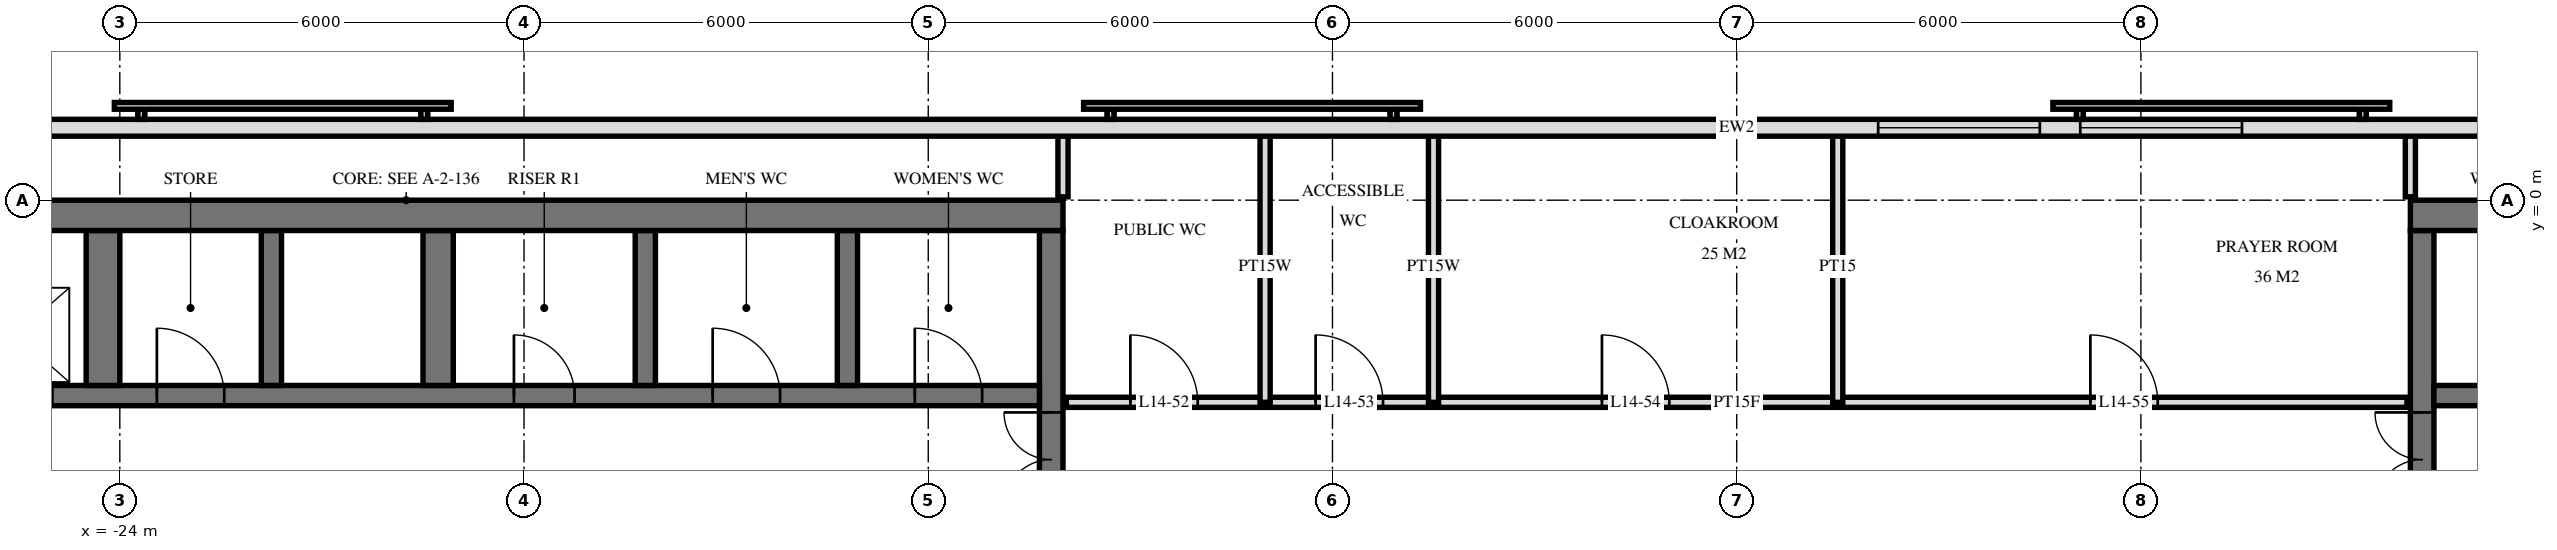
"""IFC4 building model, lengths in metres.
Left out: names, types, materials, properties, quantities, classifications, styles, units other than length and angle.
Written with IfcOpenShell. Run it as: python <this file> out.ifc"""

import sys

from ifc_helpers import new_model, si_unit, direction, frame, frame_2d, origin, place, context, subcontext, project, spatial, rectangle, extrude, element, fill, save


model = new_model("IFC4")
c1 = context("Model", 3, precision=1e-05, world=origin(), true_north=direction((0.0, 1.0)))
c2 = subcontext(c1, "Body", "Model", "MODEL_VIEW")
j1 = project(units=[si_unit("LENGTHUNIT", "METRE"), si_unit("PLANEANGLEUNIT", "RADIAN")], contexts=[c1])
p1 = place(None, origin())
s1 = spatial("IfcSite", under=j1, at=p1, CompositionType="ELEMENT")
p2 = place(p1, origin())
s2 = spatial("IfcBuilding", under=s1, at=p2, CompositionType="ELEMENT")
p3 = place(p2, frame((0.0, 0.0, 60.0)))
s3 = spatial("IfcBuildingStorey", under=s2, at=p3, CompositionType="ELEMENT", Elevation=60.0)
p4 = place(p3, frame((-29.5, -0.225, 0.0), z_axis=(0.0, 0.0, 1.0), x_axis=(1.0, 0.0, 0.0)))
e1 = element("IfcWall", 1, at=p4, inside=s3, PredefinedType="SHEAR", context=c2, shape_type="SweptSolid", body=[
    extrude(rectangle(XDim=19.5, YDim=0.45, at=frame_2d((9.75, 0.0))), origin(), (0.0, 0.0, 1.0), 3.6),
])
p5 = place(p3, frame((-10.175, -14.55, 0.0), z_axis=(0.0, 0.0, 1.0), x_axis=(0.0, 1.0, 0.0)))
e2 = element("IfcWall", 2, at=p5, inside=s3, PredefinedType="SHEAR", context=c2, shape_type="SweptSolid", body=[
    extrude(rectangle(XDim=14.1, YDim=0.35, at=frame_2d((7.05, 0.0))), origin(), (0.0, 0.0, 1.0), 3.6),
])
p6 = place(p5, frame((8.4, 0.0, 0.0)))
e3 = element("IfcOpeningElement", 3, at=p6, cuts=e2, PredefinedType="OPENING", context=c2, shape_type="SweptSolid", body=[
    extrude(rectangle(XDim=1.4, YDim=2.4, at=frame_2d((0.7, 1.2))), frame((0.0, 0.185, 0.0), z_axis=(0.0, -1.0, 0.0), x_axis=(1.0, 0.0, 0.0)), (0.0, 0.0, 1.0), 0.37),
])
p7 = place(p5, frame((10.0, 0.0, 0.0)))
e4 = element("IfcOpeningElement", 4, at=p7, cuts=e2, PredefinedType="OPENING", context=c2, shape_type="SweptSolid", body=[
    extrude(rectangle(XDim=1.4, YDim=2.4, at=frame_2d((0.7, 1.2))), frame((0.0, 0.185, 0.0), z_axis=(0.0, -1.0, 0.0), x_axis=(1.0, 0.0, 0.0)), (0.0, 0.0, 1.0), 0.37),
])
p8 = place(p5, frame((4.0, 0.0, 0.0)))
e5 = element("IfcOpeningElement", 5, at=p8, cuts=e2, PredefinedType="OPENING", context=c2, shape_type="SweptSolid", body=[
    extrude(rectangle(XDim=1.2, YDim=2.1, at=frame_2d((0.6, 1.05))), frame((0.0, 0.185, 0.0), z_axis=(0.0, -1.0, 0.0), x_axis=(1.0, 0.0, 0.0)), (0.0, 0.0, 1.0), 0.37),
])
p9 = place(p3, frame((-29.05, -2.9, 0.0), z_axis=(0.0, 0.0, 1.0), x_axis=(1.0, 0.0, 0.0)))
e6 = element("IfcWall", 6, at=p9, inside=s3, PredefinedType="SHEAR", context=c2, shape_type="SweptSolid", body=[
    extrude(rectangle(XDim=18.7, YDim=0.3, at=frame_2d((9.35, 0.0))), origin(), (0.0, 0.0, 1.0), 3.6),
])
p10 = place(p9, frame((2.95, 0.0, 0.0)))
e7 = element("IfcOpeningElement", 7, at=p10, cuts=e6, PredefinedType="OPENING", context=c2, shape_type="SweptSolid", body=[
    extrude(rectangle(XDim=1.1, YDim=2.1, at=frame_2d((0.55, 1.05))), frame((0.0, 0.16, 0.0), z_axis=(0.0, -1.0, 0.0), x_axis=(1.0, 0.0, 0.0)), (0.0, 0.0, 1.0), 0.32),
])
p11 = place(p9, frame((0.55, 0.0, 0.0)))
e8 = element("IfcOpeningElement", 8, at=p11, cuts=e6, PredefinedType="OPENING", context=c2, shape_type="SweptSolid", body=[
    extrude(rectangle(XDim=1.1, YDim=2.1, at=frame_2d((0.55, 1.05))), frame((0.0, 0.16, 0.0), z_axis=(0.0, -1.0, 0.0), x_axis=(1.0, 0.0, 0.0)), (0.0, 0.0, 1.0), 0.32),
])
p12 = place(p9, frame((10.9, 0.0, 0.0)))
e9 = element("IfcOpeningElement", 9, at=p12, cuts=e6, PredefinedType="OPENING", context=c2, shape_type="SweptSolid", body=[
    extrude(rectangle(XDim=0.9, YDim=2.1, at=frame_2d((0.45, 1.05))), frame((0.0, 0.16, 0.0), z_axis=(0.0, -1.0, 0.0), x_axis=(1.0, 0.0, 0.0)), (0.0, 0.0, 1.0), 0.32),
])
p13 = place(p9, frame((16.85, 0.0, 0.0)))
e10 = element("IfcOpeningElement", 10, at=p13, cuts=e6, PredefinedType="OPENING", context=c2, shape_type="SweptSolid", body=[
    extrude(rectangle(XDim=1.0, YDim=2.1, at=frame_2d((0.5, 1.05))), frame((0.0, 0.16, 0.0), z_axis=(0.0, -1.0, 0.0), x_axis=(1.0, 0.0, 0.0)), (0.0, 0.0, 1.0), 0.32),
])
p14 = place(p9, frame((13.85, 0.0, 0.0)))
e11 = element("IfcOpeningElement", 11, at=p14, cuts=e6, PredefinedType="OPENING", context=c2, shape_type="SweptSolid", body=[
    extrude(rectangle(XDim=1.0, YDim=2.1, at=frame_2d((0.5, 1.05))), frame((0.0, 0.16, 0.0), z_axis=(0.0, -1.0, 0.0), x_axis=(1.0, 0.0, 0.0)), (0.0, 0.0, 1.0), 0.32),
])
p15 = place(p9, frame((5.6, 0.0, 0.0)))
e12 = element("IfcOpeningElement", 12, at=p15, cuts=e6, PredefinedType="OPENING", context=c2, shape_type="SweptSolid", body=[
    extrude(rectangle(XDim=1.0, YDim=2.1, at=frame_2d((0.5, 1.05))), frame((0.0, 0.16, 0.0), z_axis=(0.0, -1.0, 0.0), x_axis=(1.0, 0.0, 0.0)), (0.0, 0.0, 1.0), 0.32),
])
for number, where, z_axis, x_axis in (
    (13, (-13.2, -2.75, 0.0), (0.0, 0.0, 1.0), (0.0, 1.0, 0.0)),
    (14, (-16.2, -2.75, 0.0), (0.0, 0.0, 1.0), (0.0, 1.0, 0.0)),
):
    element("IfcWall", number, at=place(p3, frame(where, z_axis=z_axis, x_axis=x_axis)), inside=s3, PredefinedType="SHEAR", context=c2, shape_type="SweptSolid", body=[
        extrude(rectangle(XDim=2.3, YDim=0.3, at=frame_2d((1.15, 0.0))), origin(), (0.0, 0.0, 1.0), 3.6),
    ])
p16 = place(p3, frame((-19.275, -2.75, 0.0), z_axis=(0.0, 0.0, 1.0), x_axis=(0.0, 1.0, 0.0)))
e15 = element("IfcWall", 15, at=p16, inside=s3, PredefinedType="SHEAR", context=c2, shape_type="SweptSolid", body=[
    extrude(rectangle(XDim=2.3, YDim=0.45, at=frame_2d((1.15, 0.0))), origin(), (0.0, 0.0, 1.0), 3.6),
])
p17 = place(p3, frame((-21.75, -2.75, 0.0), z_axis=(0.0, 0.0, 1.0), x_axis=(0.0, 1.0, 0.0)))
e16 = element("IfcWall", 16, at=p17, inside=s3, PredefinedType="SHEAR", context=c2, shape_type="SweptSolid", body=[
    extrude(rectangle(XDim=2.3, YDim=0.3, at=frame_2d((1.15, 0.0))), origin(), (0.0, 0.0, 1.0), 3.6),
])
p18 = place(p3, frame((-24.25, -2.75, 0.0), z_axis=(0.0, 0.0, 1.0), x_axis=(0.0, 1.0, 0.0)))
e17 = element("IfcWall", 17, at=p18, inside=s3, PredefinedType="SHEAR", context=c2, shape_type="SweptSolid", body=[
    extrude(rectangle(XDim=2.3, YDim=0.5, at=frame_2d((1.15, 0.0))), origin(), (0.0, 0.0, 1.0), 3.6),
])
p19 = place(p3, frame((10.0, -0.225, 0.0), z_axis=(0.0, 0.0, 1.0), x_axis=(1.0, 0.0, 0.0)))
e18 = element("IfcWall", 18, at=p19, inside=s3, PredefinedType="SHEAR", context=c2, shape_type="SweptSolid", body=[
    extrude(rectangle(XDim=19.5, YDim=0.45, at=frame_2d((9.75, 0.0))), origin(), (0.0, 0.0, 1.0), 3.6),
])
p20 = place(p3, frame((10.175, -14.55, 0.0), z_axis=(0.0, 0.0, 1.0), x_axis=(0.0, 1.0, 0.0)))
e19 = element("IfcWall", 19, at=p20, inside=s3, PredefinedType="SHEAR", context=c2, shape_type="SweptSolid", body=[
    extrude(rectangle(XDim=14.1, YDim=0.35, at=frame_2d((7.05, 0.0))), origin(), (0.0, 0.0, 1.0), 3.6),
])
p21 = place(p20, frame((8.4, 0.0, 0.0)))
e20 = element("IfcOpeningElement", 20, at=p21, cuts=e19, PredefinedType="OPENING", context=c2, shape_type="SweptSolid", body=[
    extrude(rectangle(XDim=1.4, YDim=2.4, at=frame_2d((0.7, 1.2))), frame((0.0, 0.185, 0.0), z_axis=(0.0, -1.0, 0.0), x_axis=(1.0, 0.0, 0.0)), (0.0, 0.0, 1.0), 0.37),
])
p22 = place(p20, frame((10.0, 0.0, 0.0)))
e21 = element("IfcOpeningElement", 21, at=p22, cuts=e19, PredefinedType="OPENING", context=c2, shape_type="SweptSolid", body=[
    extrude(rectangle(XDim=1.4, YDim=2.4, at=frame_2d((0.7, 1.2))), frame((0.0, 0.185, 0.0), z_axis=(0.0, -1.0, 0.0), x_axis=(1.0, 0.0, 0.0)), (0.0, 0.0, 1.0), 0.37),
])
p23 = place(p20, frame((4.0, 0.0, 0.0)))
e22 = element("IfcOpeningElement", 22, at=p23, cuts=e19, PredefinedType="OPENING", context=c2, shape_type="SweptSolid", body=[
    extrude(rectangle(XDim=1.2, YDim=2.1, at=frame_2d((0.6, 1.05))), frame((0.0, 0.185, 0.0), z_axis=(0.0, -1.0, 0.0), x_axis=(1.0, 0.0, 0.0)), (0.0, 0.0, 1.0), 0.37),
])
p24 = place(p3, frame((10.35, -2.9, 0.0), z_axis=(0.0, 0.0, 1.0), x_axis=(1.0, 0.0, 0.0)))
e23 = element("IfcWall", 23, at=p24, inside=s3, PredefinedType="SHEAR", context=c2, shape_type="SweptSolid", body=[
    extrude(rectangle(XDim=18.7, YDim=0.3, at=frame_2d((9.35, 0.0))), origin(), (0.0, 0.0, 1.0), 3.6),
])
p25 = place(p24, frame((14.65, 0.0, 0.0)))
e24 = element("IfcOpeningElement", 24, at=p25, cuts=e23, PredefinedType="OPENING", context=c2, shape_type="SweptSolid", body=[
    extrude(rectangle(XDim=1.1, YDim=2.1, at=frame_2d((0.55, 1.05))), frame((0.0, 0.16, 0.0), z_axis=(0.0, -1.0, 0.0), x_axis=(1.0, 0.0, 0.0)), (0.0, 0.0, 1.0), 0.32),
])
p26 = place(p24, frame((17.05, 0.0, 0.0)))
e25 = element("IfcOpeningElement", 25, at=p26, cuts=e23, PredefinedType="OPENING", context=c2, shape_type="SweptSolid", body=[
    extrude(rectangle(XDim=1.1, YDim=2.1, at=frame_2d((0.55, 1.05))), frame((0.0, 0.16, 0.0), z_axis=(0.0, -1.0, 0.0), x_axis=(1.0, 0.0, 0.0)), (0.0, 0.0, 1.0), 0.32),
])
p27 = place(p24, frame((6.9, 0.0, 0.0)))
e26 = element("IfcOpeningElement", 26, at=p27, cuts=e23, PredefinedType="OPENING", context=c2, shape_type="SweptSolid", body=[
    extrude(rectangle(XDim=0.9, YDim=2.1, at=frame_2d((0.45, 1.05))), frame((0.0, 0.16, 0.0), z_axis=(0.0, -1.0, 0.0), x_axis=(1.0, 0.0, 0.0)), (0.0, 0.0, 1.0), 0.32),
])
p28 = place(p24, frame((0.85, 0.0, 0.0)))
e27 = element("IfcOpeningElement", 27, at=p28, cuts=e23, PredefinedType="OPENING", context=c2, shape_type="SweptSolid", body=[
    extrude(rectangle(XDim=1.0, YDim=2.1, at=frame_2d((0.5, 1.05))), frame((0.0, 0.16, 0.0), z_axis=(0.0, -1.0, 0.0), x_axis=(1.0, 0.0, 0.0)), (0.0, 0.0, 1.0), 0.32),
])
p29 = place(p24, frame((3.85, 0.0, 0.0)))
e28 = element("IfcOpeningElement", 28, at=p29, cuts=e23, PredefinedType="OPENING", context=c2, shape_type="SweptSolid", body=[
    extrude(rectangle(XDim=1.0, YDim=2.1, at=frame_2d((0.5, 1.05))), frame((0.0, 0.16, 0.0), z_axis=(0.0, -1.0, 0.0), x_axis=(1.0, 0.0, 0.0)), (0.0, 0.0, 1.0), 0.32),
])
p30 = place(p24, frame((12.1, 0.0, 0.0)))
e29 = element("IfcOpeningElement", 29, at=p30, cuts=e23, PredefinedType="OPENING", context=c2, shape_type="SweptSolid", body=[
    extrude(rectangle(XDim=1.0, YDim=2.1, at=frame_2d((0.5, 1.05))), frame((0.0, 0.16, 0.0), z_axis=(0.0, -1.0, 0.0), x_axis=(1.0, 0.0, 0.0)), (0.0, 0.0, 1.0), 0.32),
])
p31 = place(p3, frame((28.775, 1.075, 0.0), z_axis=(0.0, 0.0, 1.0), x_axis=(-1.0, 0.0, 0.0)))
e30 = element("IfcWall", 30, at=p31, inside=s3, PredefinedType="SOLIDWALL", context=c2, shape_type="SweptSolid", body=[
    extrude(rectangle(XDim=57.551, YDim=0.25, at=frame_2d((28.775, 0.0))), origin(), (0.0, 0.0, 1.0), 3.32),
])
p32 = place(p31, frame((21.275, 0.0, 0.3)))
e31 = element("IfcOpeningElement", 31, at=p32, cuts=e30, PredefinedType="OPENING", context=c2, shape_type="SweptSolid", body=[
    extrude(rectangle(XDim=2.4, YDim=2.1, at=frame_2d((1.2, 1.05))), frame((0.0, 0.135, 0.0), z_axis=(0.0, -1.0, 0.0), x_axis=(1.0, 0.0, 0.0)), (0.0, 0.0, 1.0), 0.27),
])
p33 = place(p31, frame((24.275, 0.0, 0.3)))
e32 = element("IfcOpeningElement", 32, at=p33, cuts=e30, PredefinedType="OPENING", context=c2, shape_type="SweptSolid", body=[
    extrude(rectangle(XDim=2.4, YDim=2.1, at=frame_2d((1.2, 1.05))), frame((0.0, 0.135, 0.0), z_axis=(0.0, -1.0, 0.0), x_axis=(1.0, 0.0, 0.0)), (0.0, 0.0, 1.0), 0.27),
])
p34 = place(p3, frame((10.0, 0.05, 0.0), z_axis=(0.0, 0.0, 1.0), x_axis=(0.0, 1.0, 0.0)))
e33 = element("IfcWall", 33, at=p34, inside=s3, PredefinedType="PARTITIONING", context=c2, shape_type="SweptSolid", body=[
    extrude(rectangle(XDim=0.97, YDim=0.15, at=frame_2d((0.485, 0.0))), origin(), (0.0, 0.0, 1.0), 3.32),
])
p35 = place(p3, frame((1.5, -3.0, 0.0), z_axis=(0.0, 0.0, 1.0), x_axis=(0.0, 1.0, 0.0)))
e34 = element("IfcWall", 34, at=p35, inside=s3, PredefinedType="PARTITIONING", context=c2, shape_type="SweptSolid", body=[
    extrude(rectangle(XDim=4.02, YDim=0.15, at=frame_2d((2.01, 0.0))), origin(), (0.0, 0.0, 1.0), 3.32),
])
for number, where, z_axis, x_axis in (
    (35, (-4.5, -3.0, 0.0), (0.0, 0.0, 1.0), (0.0, 1.0, 0.0)),
    (36, (-7.0, -3.0, 0.0), (0.0, 0.0, 1.0), (0.0, 1.0, 0.0)),
):
    element("IfcWall", number, at=place(p3, frame(where, z_axis=z_axis, x_axis=x_axis)), inside=s3, PredefinedType="PLUMBINGWALL", context=c2, shape_type="SweptSolid", body=[
        extrude(rectangle(XDim=4.02, YDim=0.15, at=frame_2d((2.01, 0.0))), origin(), (0.0, 0.0, 1.0), 3.32),
    ])
p36 = place(p3, frame((-10.0, 0.05, 0.0), z_axis=(0.0, 0.0, 1.0), x_axis=(0.0, 1.0, 0.0)))
e37 = element("IfcWall", 37, at=p36, inside=s3, PredefinedType="PLUMBINGWALL", context=c2, shape_type="SweptSolid", body=[
    extrude(rectangle(XDim=0.97, YDim=0.15, at=frame_2d((0.485, 0.0))), origin(), (0.0, 0.0, 1.0), 3.32),
])
p37 = place(p3, frame((-9.95, -3.0, 0.0), z_axis=(0.0, 0.0, 1.0), x_axis=(1.0, 0.0, 0.0)))
e38 = element("IfcWall", 38, at=p37, inside=s3, PredefinedType="PARTITIONING", context=c2, shape_type="SweptSolid", body=[
    extrude(rectangle(XDim=19.9, YDim=0.15, at=frame_2d((9.95, 0.0))), origin(), (0.0, 0.0, 1.0), 3.32),
])
p38 = place(p37, frame((0.95, 0.0, 0.0)))
e39 = element("IfcOpeningElement", 39, at=p38, cuts=e38, PredefinedType="OPENING", context=c2, shape_type="SweptSolid", body=[
    extrude(rectangle(XDim=1.0, YDim=2.1, at=frame_2d((0.5, 1.05))), frame((0.0, 0.085, 0.0), z_axis=(0.0, -1.0, 0.0), x_axis=(1.0, 0.0, 0.0)), (0.0, 0.0, 1.0), 0.17),
])
p39 = place(p37, frame((3.7, 0.0, 0.0)))
e40 = element("IfcOpeningElement", 40, at=p39, cuts=e38, PredefinedType="OPENING", context=c2, shape_type="SweptSolid", body=[
    extrude(rectangle(XDim=1.0, YDim=2.1, at=frame_2d((0.5, 1.05))), frame((0.0, 0.085, 0.0), z_axis=(0.0, -1.0, 0.0), x_axis=(1.0, 0.0, 0.0)), (0.0, 0.0, 1.0), 0.17),
])
p40 = place(p37, frame((7.95, 0.0, 0.0)))
e41 = element("IfcOpeningElement", 41, at=p40, cuts=e38, PredefinedType="OPENING", context=c2, shape_type="SweptSolid", body=[
    extrude(rectangle(XDim=1.0, YDim=2.1, at=frame_2d((0.5, 1.05))), frame((0.0, 0.085, 0.0), z_axis=(0.0, -1.0, 0.0), x_axis=(1.0, 0.0, 0.0)), (0.0, 0.0, 1.0), 0.17),
])
p41 = place(p37, frame((15.2, 0.0, 0.0)))
e42 = element("IfcOpeningElement", 42, at=p41, cuts=e38, PredefinedType="OPENING", context=c2, shape_type="SweptSolid", body=[
    extrude(rectangle(XDim=1.0, YDim=2.1, at=frame_2d((0.5, 1.05))), frame((0.0, 0.085, 0.0), z_axis=(0.0, -1.0, 0.0), x_axis=(1.0, 0.0, 0.0)), (0.0, 0.0, 1.0), 0.17),
])
p42 = place(p32, origin())
e43 = element("IfcWindow", 43, at=p42, inside=s3, PartitioningType="SINGLE_PANEL", PredefinedType="WINDOW", context=c2, shape_type="SweptSolid", body=[
    extrude(rectangle(XDim=2.4, YDim=2.1, at=frame_2d((1.2, 1.05))), frame((0.0, 0.03, 0.0), z_axis=(0.0, -1.0, 0.0), x_axis=(1.0, 0.0, 0.0)), (0.0, 0.0, 1.0), 0.06),
])
fill(e31, e43)
p43 = place(p33, origin())
e44 = element("IfcWindow", 44, at=p43, inside=s3, PartitioningType="SINGLE_PANEL", PredefinedType="WINDOW", context=c2, shape_type="SweptSolid", body=[
    extrude(rectangle(XDim=2.4, YDim=2.1, at=frame_2d((1.2, 1.05))), frame((0.0, 0.03, 0.0), z_axis=(0.0, -1.0, 0.0), x_axis=(1.0, 0.0, 0.0)), (0.0, 0.0, 1.0), 0.06),
])
fill(e32, e44)
p44 = place(p7, origin())
e45 = element("IfcDoor", 45, at=p44, inside=s3, OperationType="DOUBLE_DOOR_SINGLE_SWING", PredefinedType="DOOR", context=c2, shape_type="SweptSolid", body=[
    extrude(rectangle(XDim=1.4, YDim=2.4, at=frame_2d((0.7, 1.2))), frame((0.0, 0.025, 0.0), z_axis=(0.0, -1.0, 0.0), x_axis=(1.0, 0.0, 0.0)), (0.0, 0.0, 1.0), 0.05),
])
fill(e4, e45)
p45 = place(p12, origin())
e46 = element("IfcDoor", 46, at=p45, inside=s3, OperationType="SINGLE_SWING_RIGHT", PredefinedType="DOOR", context=c2, shape_type="SweptSolid", body=[
    extrude(rectangle(XDim=0.9, YDim=2.1, at=frame_2d((0.45, 1.05))), frame((0.0, 0.025, 0.0), z_axis=(0.0, -1.0, 0.0), x_axis=(1.0, 0.0, 0.0)), (0.0, 0.0, 1.0), 0.05),
])
fill(e9, e46)
p46 = place(p13, origin())
e47 = element("IfcDoor", 47, at=p46, inside=s3, OperationType="SINGLE_SWING_RIGHT", PredefinedType="DOOR", context=c2, shape_type="SweptSolid", body=[
    extrude(rectangle(XDim=1.0, YDim=2.1, at=frame_2d((0.5, 1.05))), frame((0.0, 0.025, 0.0), z_axis=(0.0, -1.0, 0.0), x_axis=(1.0, 0.0, 0.0)), (0.0, 0.0, 1.0), 0.05),
])
fill(e10, e47)
p47 = place(p14, origin())
e48 = element("IfcDoor", 48, at=p47, inside=s3, OperationType="SINGLE_SWING_RIGHT", PredefinedType="DOOR", context=c2, shape_type="SweptSolid", body=[
    extrude(rectangle(XDim=1.0, YDim=2.1, at=frame_2d((0.5, 1.05))), frame((0.0, 0.025, 0.0), z_axis=(0.0, -1.0, 0.0), x_axis=(1.0, 0.0, 0.0)), (0.0, 0.0, 1.0), 0.05),
])
fill(e11, e48)
p48 = place(p15, origin())
e49 = element("IfcDoor", 49, at=p48, inside=s3, OperationType="SINGLE_SWING_RIGHT", PredefinedType="DOOR", context=c2, shape_type="SweptSolid", body=[
    extrude(rectangle(XDim=1.0, YDim=2.1, at=frame_2d((0.5, 1.05))), frame((0.0, 0.025, 0.0), z_axis=(0.0, -1.0, 0.0), x_axis=(1.0, 0.0, 0.0)), (0.0, 0.0, 1.0), 0.05),
])
fill(e12, e49)
p49 = place(p22, origin())
e50 = element("IfcDoor", 50, at=p49, inside=s3, OperationType="DOUBLE_DOOR_SINGLE_SWING", PredefinedType="DOOR", context=c2, shape_type="SweptSolid", body=[
    extrude(rectangle(XDim=1.4, YDim=2.4, at=frame_2d((0.7, 1.2))), frame((0.0, 0.025, 0.0), z_axis=(0.0, -1.0, 0.0), x_axis=(1.0, 0.0, 0.0)), (0.0, 0.0, 1.0), 0.05),
])
fill(e21, e50)
p50 = place(p38, origin())
e51 = element("IfcDoor", 51, at=p50, inside=s3, OperationType="SINGLE_SWING_RIGHT", PredefinedType="DOOR", context=c2, shape_type="SweptSolid", body=[
    extrude(rectangle(XDim=1.0, YDim=2.1, at=frame_2d((0.5, 1.05))), frame((0.0, 0.025, 0.0), z_axis=(0.0, -1.0, 0.0), x_axis=(1.0, 0.0, 0.0)), (0.0, 0.0, 1.0), 0.05),
])
fill(e39, e51)
p51 = place(p39, origin())
e52 = element("IfcDoor", 52, at=p51, inside=s3, OperationType="SINGLE_SWING_RIGHT", PredefinedType="DOOR", context=c2, shape_type="SweptSolid", body=[
    extrude(rectangle(XDim=1.0, YDim=2.1, at=frame_2d((0.5, 1.05))), frame((0.0, 0.025, 0.0), z_axis=(0.0, -1.0, 0.0), x_axis=(1.0, 0.0, 0.0)), (0.0, 0.0, 1.0), 0.05),
])
fill(e40, e52)
p52 = place(p40, origin())
e53 = element("IfcDoor", 53, at=p52, inside=s3, OperationType="SINGLE_SWING_RIGHT", PredefinedType="DOOR", context=c2, shape_type="SweptSolid", body=[
    extrude(rectangle(XDim=1.0, YDim=2.1, at=frame_2d((0.5, 1.05))), frame((0.0, 0.025, 0.0), z_axis=(0.0, -1.0, 0.0), x_axis=(1.0, 0.0, 0.0)), (0.0, 0.0, 1.0), 0.05),
])
fill(e41, e53)
p53 = place(p41, origin())
e54 = element("IfcDoor", 54, at=p53, inside=s3, OperationType="SINGLE_SWING_RIGHT", PredefinedType="DOOR", context=c2, shape_type="SweptSolid", body=[
    extrude(rectangle(XDim=1.0, YDim=2.1, at=frame_2d((0.5, 1.05))), frame((0.0, 0.025, 0.0), z_axis=(0.0, -1.0, 0.0), x_axis=(1.0, 0.0, 0.0)), (0.0, 0.0, 1.0), 0.05),
])
fill(e42, e54)
save(model, sys.argv[1])
